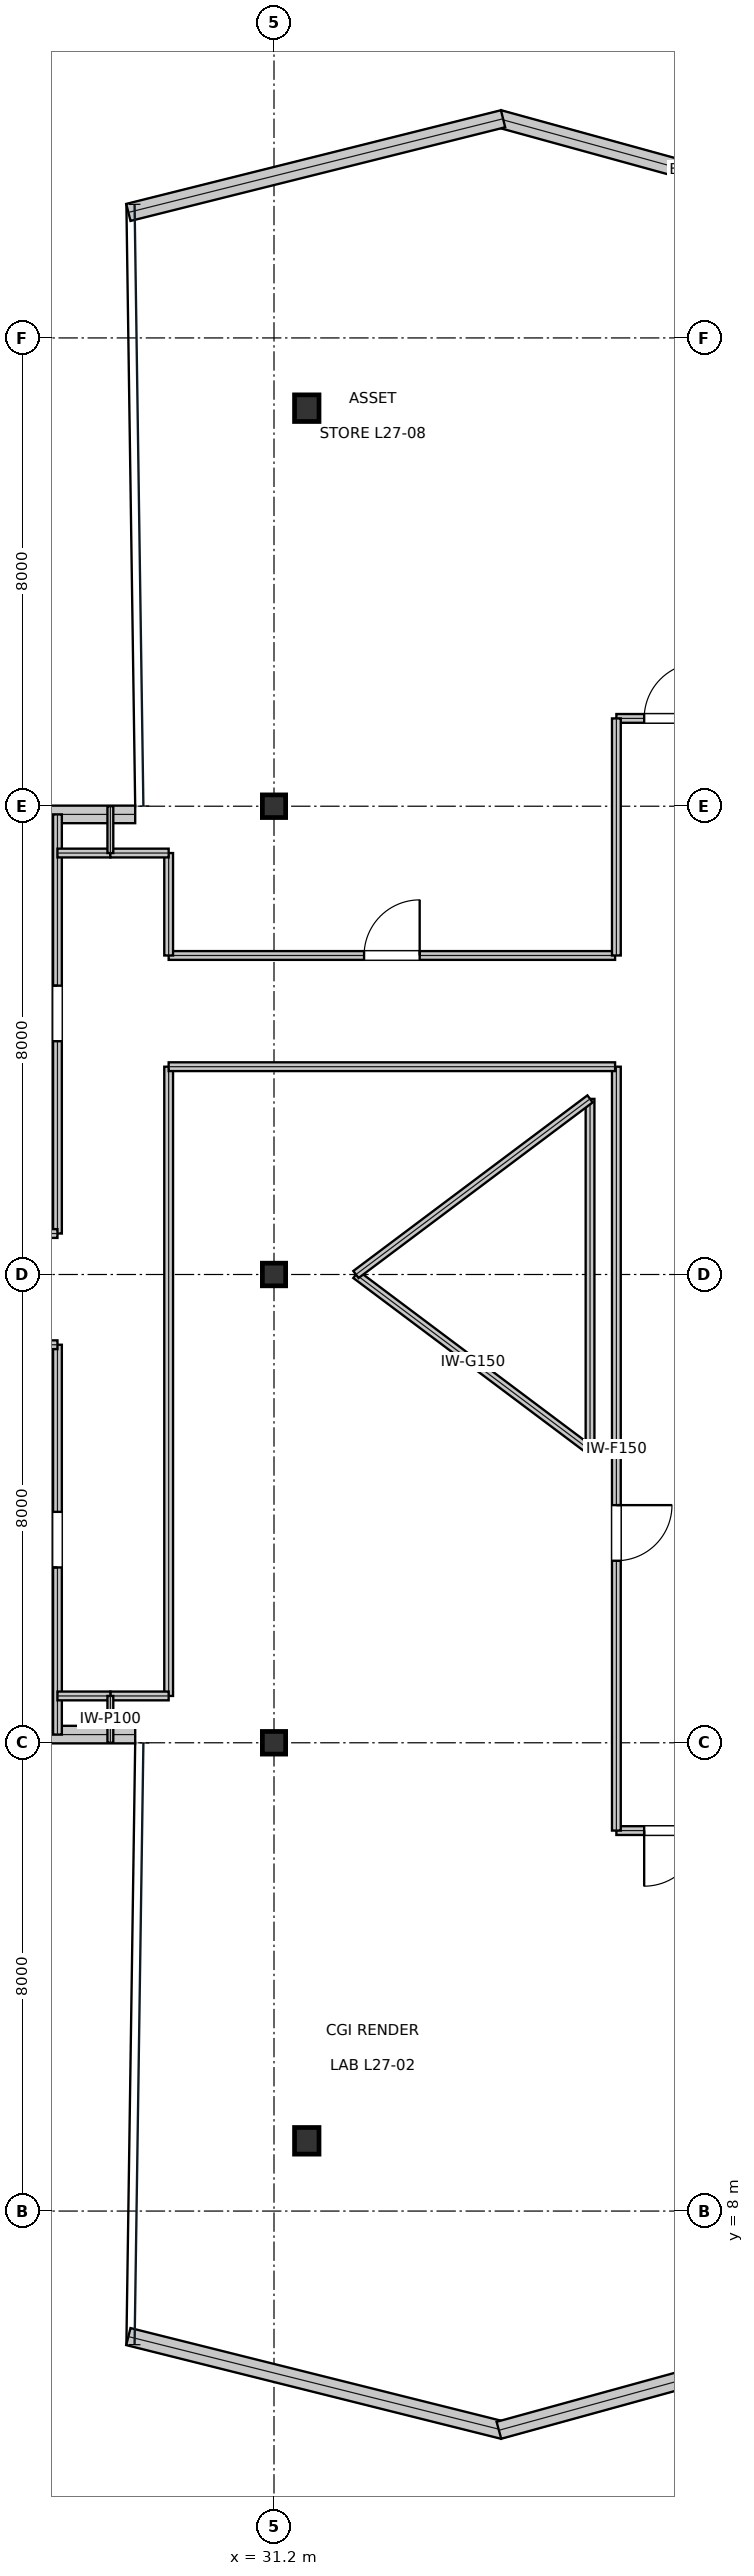
"""IFC4 building model, lengths in metres.
Left out: names, types, materials, properties, quantities, classifications, styles, units other than length and angle.
Written with IfcOpenShell. Run it as: python <this file> out.ifc"""

import sys

from ifc_helpers import new_model, si_unit, direction, frame, frame_2d, origin, origin_2d, place, context, subcontext, project, spatial, rectangle, i_section, extrude, element, fill, save


model = new_model("IFC4")
c1 = context("Model", 3, precision=1e-05, world=origin(), true_north=direction((0.0, 1.0)))
c2 = subcontext(c1, "Body", "Model", "MODEL_VIEW")
j1 = project(units=[si_unit("LENGTHUNIT", "METRE"), si_unit("PLANEANGLEUNIT", "RADIAN")], contexts=[c1])
p1 = place(None, origin())
s1 = spatial("IfcSite", under=j1, at=p1, CompositionType="ELEMENT")
p2 = place(p1, origin())
s2 = spatial("IfcBuilding", under=s1, at=p2, CompositionType="ELEMENT")
p3 = place(p2, frame((0.0, 0.0, 120.9)))
s3 = spatial("IfcBuildingStorey", under=s2, at=p3, CompositionType="ELEMENT", Elevation=120.9)
for number, where, z_axis, x_axis in (
    (1, (31.2, 16.0, 0.0), (0.0, 0.0, 1.0), (1.0, 0.0, 0.0)),
    (2, (31.2, 24.0, 0.0), (0.0, 0.0, 1.0), (1.0, 0.0, 0.0)),
    (3, (31.2, 32.0, 0.0), (0.0, 0.0, 1.0), (1.0, 0.0, 0.0)),
):
    element("IfcColumn", number, at=place(p3, frame(where, z_axis=z_axis, x_axis=x_axis)), inside=s3, PredefinedType="COLUMN", context=c2, shape_type="SweptSolid", body=[
        extrude(i_section(OverallWidth=0.398, OverallDepth=0.387, WebThickness=0.021, FlangeThickness=0.033, at=origin_2d()), origin(), (0.0, 0.0, 1.0), 4.044),
    ])
for number, where, z_axis, x_axis in (
    (4, (31.76, 38.8, 0.016), (0.0, 0.0, 1.0), (1.0, 0.0, 0.0)),
    (5, (31.76, 9.2, 0.016), (0.0, 0.0, 1.0), (1.0, 0.0, 0.0)),
):
    element("IfcColumn", number, at=place(p3, frame(where, z_axis=z_axis, x_axis=x_axis)), inside=s3, PredefinedType="COLUMN", context=c2, shape_type="SweptSolid", body=[
        extrude(i_section(OverallWidth=0.418, OverallDepth=0.455, WebThickness=0.042, FlangeThickness=0.068, at=origin_2d()), origin(), (0.0, 0.0, 1.0), 4.018),
    ])
p4 = place(p3, frame((41.445, 41.985, 0.0), z_axis=(0.0, 0.0, 1.0), x_axis=(-0.96422724659, 0.265077001894, 0.0)))
e6 = element("IfcWall", 6, at=p4, inside=s3, PredefinedType="STANDARD", context=c2, shape_type="SweptSolid", body=[
    extrude(rectangle(XDim=6.64, YDim=0.3, at=frame_2d((3.32, 0.0))), origin(), (0.0, 0.0, 1.0), 3.81),
])
p5 = place(p3, frame((35.114, 43.744, 0.0), z_axis=(0.0, 0.0, 1.0), x_axis=(-0.970168608955, -0.242431165897, 0.0)))
e7 = element("IfcWall", 7, at=p5, inside=s3, PredefinedType="STANDARD", context=c2, shape_type="SweptSolid", body=[
    extrude(rectangle(XDim=6.599, YDim=0.3, at=frame_2d((3.3, 0.0))), origin(), (0.0, 0.0, 1.0), 3.81),
])
for number, where, z_axis, x_axis in (
    (8, (28.828, 31.86, 0.0), (0.0, 0.0, 1.0), (-1.0, 0.0, 0.0)),
    (9, (26.04, 16.14, 0.0), (0.0, 0.0, 1.0), (1.0, 0.0, 0.0)),
):
    element("IfcWall", number, at=place(p3, frame(where, z_axis=z_axis, x_axis=x_axis)), inside=s3, PredefinedType="STANDARD", context=c2, shape_type="SweptSolid", body=[
        extrude(rectangle(XDim=2.788, YDim=0.3, at=frame_2d((1.394, 0.0))), origin(), (0.0, 0.0, 1.0), 3.81),
    ])
p6 = place(p3, frame((28.712, 5.856, 0.0), z_axis=(0.0, 0.0, 1.0), x_axis=(0.970168608955, -0.242431165897, 0.0)))
e10 = element("IfcWall", 10, at=p6, inside=s3, PredefinedType="STANDARD", context=c2, shape_type="SweptSolid", body=[
    extrude(rectangle(XDim=6.599, YDim=0.3, at=frame_2d((3.3, 0.0))), origin(), (0.0, 0.0, 1.0), 3.81),
])
p7 = place(p3, frame((35.043, 4.255, 0.0), z_axis=(0.0, 0.0, 1.0), x_axis=(0.96422724659, 0.265077001894, 0.0)))
e11 = element("IfcWall", 11, at=p7, inside=s3, PredefinedType="STANDARD", context=c2, shape_type="SweptSolid", body=[
    extrude(rectangle(XDim=6.64, YDim=0.3, at=frame_2d((3.32, 0.0))), origin(), (0.0, 0.0, 1.0), 3.81),
])
p8 = place(p3, frame((37.05, 14.5, 0.0), z_axis=(0.0, 0.0, 1.0), x_axis=(1.0, 0.0, 0.0)))
e12 = element("IfcWall", 12, at=p8, inside=s3, PredefinedType="PARTITIONING", context=c2, shape_type="SweptSolid", body=[
    extrude(rectangle(XDim=1.9, YDim=0.15, at=frame_2d((0.95, 0.0))), origin(), (0.0, 0.0, 1.0), 3.19),
])
p9 = place(p8, frame((0.475, 0.0, 0.0)))
e13 = element("IfcOpeningElement", 13, at=p9, cuts=e12, PredefinedType="OPENING", context=c2, shape_type="SweptSolid", body=[
    extrude(rectangle(XDim=0.95, YDim=2.15, at=frame_2d((0.475, 1.075))), frame((0.0, 0.085, 0.0), z_axis=(0.0, -1.0, 0.0), x_axis=(1.0, 0.0, 0.0)), (0.0, 0.0, 1.0), 0.17),
])
p10 = place(p3, frame((37.05, 14.5, 0.0), z_axis=(0.0, 0.0, 1.0), x_axis=(0.0, 1.0, 0.0)))
e14 = element("IfcWall", 14, at=p10, inside=s3, PredefinedType="PARTITIONING", context=c2, shape_type="SweptSolid", body=[
    extrude(rectangle(XDim=13.05, YDim=0.15, at=frame_2d((6.525, 0.0))), origin(), (0.0, 0.0, 1.0), 3.19),
])
p11 = place(p10, frame((4.61, 0.0, 0.0)))
e15 = element("IfcOpeningElement", 15, at=p11, cuts=e14, PredefinedType="OPENING", context=c2, shape_type="SweptSolid", body=[
    extrude(rectangle(XDim=0.95, YDim=2.15, at=frame_2d((0.475, 1.075))), frame((0.0, 0.085, 0.0), z_axis=(0.0, -1.0, 0.0), x_axis=(1.0, 0.0, 0.0)), (0.0, 0.0, 1.0), 0.17),
])
p12 = place(p3, frame((27.5, 16.14, 0.0), z_axis=(0.0, 0.0, 1.0), x_axis=(0.0, 1.0, 0.0)))
e16 = element("IfcWall", 16, at=p12, inside=s3, PredefinedType="PARTITIONING", context=c2, shape_type="SweptSolid", body=[
    extrude(rectangle(XDim=6.66, YDim=0.15, at=frame_2d((3.33, 0.0))), origin(), (0.0, 0.0, 1.0), 3.338),
])
p13 = place(p12, frame((2.855, 0.0, 0.0)))
e17 = element("IfcOpeningElement", 17, at=p13, cuts=e16, PredefinedType="OPENING", context=c2, shape_type="SweptSolid", body=[
    extrude(rectangle(XDim=0.95, YDim=2.15, at=frame_2d((0.475, 1.075))), frame((0.0, 0.085, 0.0), z_axis=(0.0, -1.0, 0.0), x_axis=(1.0, 0.0, 0.0)), (0.0, 0.0, 1.0), 0.17),
])
p14 = place(p3, frame((27.5, 24.7, 0.0), z_axis=(0.0, 0.0, 1.0), x_axis=(0.0, 1.0, 0.0)))
e18 = element("IfcWall", 18, at=p14, inside=s3, PredefinedType="PARTITIONING", context=c2, shape_type="SweptSolid", body=[
    extrude(rectangle(XDim=7.16, YDim=0.15, at=frame_2d((3.58, 0.0))), origin(), (0.0, 0.0, 1.0), 3.338),
])
p15 = place(p14, frame((3.285, 0.0, 0.0)))
e19 = element("IfcOpeningElement", 19, at=p15, cuts=e18, PredefinedType="OPENING", context=c2, shape_type="SweptSolid", body=[
    extrude(rectangle(XDim=0.95, YDim=2.15, at=frame_2d((0.475, 1.075))), frame((0.0, 0.085, 0.0), z_axis=(0.0, -1.0, 0.0), x_axis=(1.0, 0.0, 0.0)), (0.0, 0.0, 1.0), 0.17),
])
p16 = place(p3, frame((29.4, 29.45, 0.0), z_axis=(0.0, 0.0, 1.0), x_axis=(1.0, 0.0, 0.0)))
e20 = element("IfcWall", 20, at=p16, inside=s3, PredefinedType="PARTITIONING", context=c2, shape_type="SweptSolid", body=[
    extrude(rectangle(XDim=7.628, YDim=0.15, at=frame_2d((3.814, 0.0))), origin(), (0.0, 0.0, 1.0), 3.19),
])
p17 = place(p16, frame((3.339, 0.0, 0.0)))
e21 = element("IfcOpeningElement", 21, at=p17, cuts=e20, PredefinedType="OPENING", context=c2, shape_type="SweptSolid", body=[
    extrude(rectangle(XDim=0.95, YDim=2.15, at=frame_2d((0.475, 1.075))), frame((0.0, 0.085, 0.0), z_axis=(0.0, -1.0, 0.0), x_axis=(1.0, 0.0, 0.0)), (0.0, 0.0, 1.0), 0.17),
])
p18 = place(p3, frame((37.05, 33.5, 0.0), z_axis=(0.0, 0.0, 1.0), x_axis=(1.0, 0.0, 0.0)))
e22 = element("IfcWall", 22, at=p18, inside=s3, PredefinedType="PARTITIONING", context=c2, shape_type="SweptSolid", body=[
    extrude(rectangle(XDim=1.9, YDim=0.15, at=frame_2d((0.95, 0.0))), origin(), (0.0, 0.0, 1.0), 3.19),
])
p19 = place(p18, frame((0.475, 0.0, 0.0)))
e23 = element("IfcOpeningElement", 23, at=p19, cuts=e22, PredefinedType="OPENING", context=c2, shape_type="SweptSolid", body=[
    extrude(rectangle(XDim=0.95, YDim=2.15, at=frame_2d((0.475, 1.075))), frame((0.0, 0.085, 0.0), z_axis=(0.0, -1.0, 0.0), x_axis=(1.0, 0.0, 0.0)), (0.0, 0.0, 1.0), 0.17),
])
p20 = place(p3, frame((29.4, 16.8, 0.0), z_axis=(0.0, 0.0, 1.0), x_axis=(0.0, 1.0, 0.0)))
e24 = element("IfcWall", 24, at=p20, inside=s3, PredefinedType="PARTITIONING", context=c2, shape_type="SweptSolid", body=[
    extrude(rectangle(XDim=10.75, YDim=0.15, at=frame_2d((5.375, 0.0))), origin(), (0.0, 0.0, 1.0), 3.19),
])
p21 = place(p3, frame((29.4, 27.55, 0.0), z_axis=(0.0, 0.0, 1.0), x_axis=(1.0, 0.0, 0.0)))
e25 = element("IfcWall", 25, at=p21, inside=s3, PredefinedType="PARTITIONING", context=c2, shape_type="SweptSolid", body=[
    extrude(rectangle(XDim=7.628, YDim=0.15, at=frame_2d((3.814, 0.0))), origin(), (0.0, 0.0, 1.0), 3.19),
])
p22 = place(p3, frame((28.404, 16.8, 0.0), z_axis=(0.0, 0.0, 1.0), x_axis=(1.0, 0.0, 0.0)))
e26 = element("IfcWall", 26, at=p22, inside=s3, PredefinedType="PARTITIONING", context=c2, shape_type="SweptSolid", body=[
    extrude(rectangle(XDim=0.996, YDim=0.15, at=frame_2d((0.498, 0.0))), origin(), (0.0, 0.0, 1.0), 3.81),
])
p23 = place(p3, frame((23.1, 22.8, 0.0), z_axis=(0.0, 0.0, 1.0), x_axis=(1.0, 0.0, 0.0)))
e27 = element("IfcWall", 27, at=p23, inside=s3, PredefinedType="PARTITIONING", context=c2, shape_type="SweptSolid", body=[
    extrude(rectangle(XDim=4.4, YDim=0.15, at=frame_2d((2.2, 0.0))), origin(), (0.0, 0.0, 1.0), 3.19),
])
p24 = place(p3, frame((27.5, 16.8, 0.0), z_axis=(0.0, 0.0, 1.0), x_axis=(1.0, 0.0, 0.0)))
e28 = element("IfcWall", 28, at=p24, inside=s3, PredefinedType="PARTITIONING", context=c2, shape_type="SweptSolid", body=[
    extrude(rectangle(XDim=0.904, YDim=0.15, at=frame_2d((0.452, 0.0))), origin(), (0.0, 0.0, 1.0), 3.338),
])
p25 = place(p3, frame((23.1, 24.7, 0.0), z_axis=(0.0, 0.0, 1.0), x_axis=(1.0, 0.0, 0.0)))
e29 = element("IfcWall", 29, at=p25, inside=s3, PredefinedType="PARTITIONING", context=c2, shape_type="SweptSolid", body=[
    extrude(rectangle(XDim=4.4, YDim=0.15, at=frame_2d((2.2, 0.0))), origin(), (0.0, 0.0, 1.0), 3.19),
])
p26 = place(p3, frame((27.5, 31.2, 0.0), z_axis=(0.0, 0.0, 1.0), x_axis=(1.0, 0.0, 0.0)))
e30 = element("IfcWall", 30, at=p26, inside=s3, PredefinedType="PARTITIONING", context=c2, shape_type="SweptSolid", body=[
    extrude(rectangle(XDim=0.904, YDim=0.15, at=frame_2d((0.452, 0.0))), origin(), (0.0, 0.0, 1.0), 3.338),
])
p27 = place(p3, frame((37.05, 29.45, 0.0), z_axis=(0.0, 0.0, 1.0), x_axis=(0.0, 1.0, 0.0)))
e31 = element("IfcWall", 31, at=p27, inside=s3, PredefinedType="PARTITIONING", context=c2, shape_type="SweptSolid", body=[
    extrude(rectangle(XDim=4.05, YDim=0.15, at=frame_2d((2.025, 0.0))), origin(), (0.0, 0.0, 1.0), 3.19),
])
p28 = place(p3, frame((29.4, 29.45, 0.0), z_axis=(0.0, 0.0, 1.0), x_axis=(0.0, 1.0, 0.0)))
e32 = element("IfcWall", 32, at=p28, inside=s3, PredefinedType="PARTITIONING", context=c2, shape_type="SweptSolid", body=[
    extrude(rectangle(XDim=1.75, YDim=0.15, at=frame_2d((0.875, 0.0))), origin(), (0.0, 0.0, 1.0), 3.81),
])
p29 = place(p3, frame((28.404, 31.2, 0.0), z_axis=(0.0, 0.0, 1.0), x_axis=(1.0, 0.0, 0.0)))
e33 = element("IfcWall", 33, at=p29, inside=s3, PredefinedType="PARTITIONING", context=c2, shape_type="SweptSolid", body=[
    extrude(rectangle(XDim=0.996, YDim=0.15, at=frame_2d((0.498, 0.0))), origin(), (0.0, 0.0, 1.0), 3.81),
])
for number, where, z_axis, x_axis in (
    (34, (28.404, 16.0, 0.0), (0.0, 0.0, 1.0), (0.0, 1.0, 0.0)),
    (35, (28.404, 31.2, 0.0), (0.0, 0.0, 1.0), (0.0, 1.0, 0.0)),
):
    element("IfcWall", number, at=place(p3, frame(where, z_axis=z_axis, x_axis=x_axis)), inside=s3, PredefinedType="PARTITIONING", context=c2, shape_type="SweptSolid", body=[
        extrude(rectangle(XDim=0.8, YDim=0.1, at=frame_2d((0.4, 0.0))), origin(), (0.0, 0.0, 1.0), 3.338),
    ])
p30 = place(p3, frame((32.6, 24.0, 0.0), z_axis=(0.0, 0.0, 1.0), x_axis=(0.8, -0.6, 0.0)))
e36 = element("IfcWall", 36, at=p30, inside=s3, PredefinedType="MOVABLE", context=c2, shape_type="SweptSolid", body=[
    extrude(rectangle(XDim=5.0, YDim=0.15, at=frame_2d((2.5, 0.0))), origin(), (0.0, 0.0, 1.0), 3.81),
])
p31 = place(p3, frame((36.6, 21.0, 0.0), z_axis=(0.0, 0.0, 1.0), x_axis=(0.0, 1.0, 0.0)))
e37 = element("IfcWall", 37, at=p31, inside=s3, PredefinedType="MOVABLE", context=c2, shape_type="SweptSolid", body=[
    extrude(rectangle(XDim=6.0, YDim=0.15, at=frame_2d((3.0, 0.0))), origin(), (0.0, 0.0, 1.0), 3.81),
])
p32 = place(p3, frame((36.6, 27.0, 0.0), z_axis=(0.0, 0.0, 1.0), x_axis=(-0.8, -0.6, 0.0)))
e38 = element("IfcWall", 38, at=p32, inside=s3, PredefinedType="MOVABLE", context=c2, shape_type="SweptSolid", body=[
    extrude(rectangle(XDim=5.0, YDim=0.15, at=frame_2d((2.5, 0.0))), origin(), (0.0, 0.0, 1.0), 3.81),
])
p33 = place(p9, frame((0.95, 0.0, 0.0), z_axis=(0.0, 0.0, 1.0), x_axis=(-1.0, 0.0, 0.0)))
e39 = element("IfcDoor", 39, at=p33, inside=s3, OperationType="SINGLE_SWING_RIGHT", PredefinedType="DOOR", context=c2, shape_type="SweptSolid", body=[
    extrude(rectangle(XDim=0.95, YDim=2.15, at=frame_2d((0.475, 1.075))), frame((0.0, 0.025, 0.0), z_axis=(0.0, -1.0, 0.0), x_axis=(1.0, 0.0, 0.0)), (0.0, 0.0, 1.0), 0.05),
])
fill(e13, e39)
p34 = place(p11, frame((0.95, 0.0, 0.0), z_axis=(0.0, 0.0, 1.0), x_axis=(-1.0, 0.0, 0.0)))
e40 = element("IfcDoor", 40, at=p34, inside=s3, OperationType="SINGLE_SWING_LEFT", PredefinedType="DOOR", context=c2, shape_type="SweptSolid", body=[
    extrude(rectangle(XDim=0.95, YDim=2.15, at=frame_2d((0.475, 1.075))), frame((0.0, 0.025, 0.0), z_axis=(0.0, -1.0, 0.0), x_axis=(1.0, 0.0, 0.0)), (0.0, 0.0, 1.0), 0.05),
])
fill(e15, e40)
p35 = place(p13, origin())
e41 = element("IfcDoor", 41, at=p35, inside=s3, OperationType="SINGLE_SWING_LEFT", PredefinedType="DOOR", context=c2, shape_type="SweptSolid", body=[
    extrude(rectangle(XDim=0.95, YDim=2.15, at=frame_2d((0.475, 1.075))), frame((0.0, 0.025, 0.0), z_axis=(0.0, -1.0, 0.0), x_axis=(1.0, 0.0, 0.0)), (0.0, 0.0, 1.0), 0.05),
])
fill(e17, e41)
p36 = place(p15, origin())
e42 = element("IfcDoor", 42, at=p36, inside=s3, OperationType="SINGLE_SWING_RIGHT", PredefinedType="DOOR", context=c2, shape_type="SweptSolid", body=[
    extrude(rectangle(XDim=0.95, YDim=2.15, at=frame_2d((0.475, 1.075))), frame((0.0, 0.025, 0.0), z_axis=(0.0, -1.0, 0.0), x_axis=(1.0, 0.0, 0.0)), (0.0, 0.0, 1.0), 0.05),
])
fill(e19, e42)
p37 = place(p17, origin())
e43 = element("IfcDoor", 43, at=p37, inside=s3, OperationType="SINGLE_SWING_RIGHT", PredefinedType="DOOR", context=c2, shape_type="SweptSolid", body=[
    extrude(rectangle(XDim=0.95, YDim=2.15, at=frame_2d((0.475, 1.075))), frame((0.0, 0.025, 0.0), z_axis=(0.0, -1.0, 0.0), x_axis=(1.0, 0.0, 0.0)), (0.0, 0.0, 1.0), 0.05),
])
fill(e21, e43)
p38 = place(p19, origin())
e44 = element("IfcDoor", 44, at=p38, inside=s3, OperationType="SINGLE_SWING_RIGHT", PredefinedType="DOOR", context=c2, shape_type="SweptSolid", body=[
    extrude(rectangle(XDim=0.95, YDim=2.15, at=frame_2d((0.475, 1.075))), frame((0.0, 0.025, 0.0), z_axis=(0.0, -1.0, 0.0), x_axis=(1.0, 0.0, 0.0)), (0.0, 0.0, 1.0), 0.05),
])
fill(e23, e44)
save(model, sys.argv[1])
